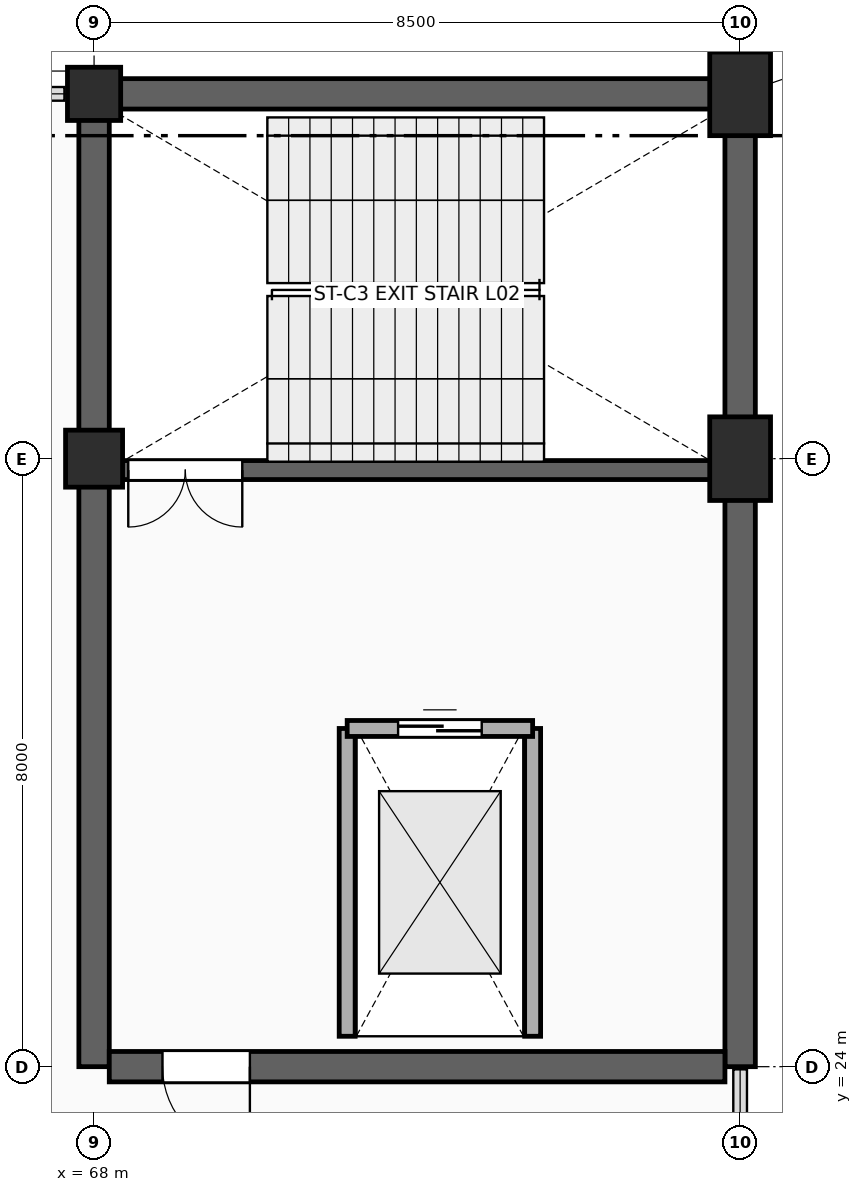
"""IFC4 building model, lengths in metres.
Left out: names, types, materials, properties, quantities, classifications, styles, units other than length and angle.
Written with IfcOpenShell. Run it as: python <this file> out.ifc"""

import sys

from ifc_helpers import new_model, si_unit, direction, frame, frame_2d, origin, origin_2d, place, context, subcontext, project, spatial, rectangle, extrude, element, fill, save


model = new_model("IFC4")
c1 = context("Model", 3, precision=1e-05, world=origin(), true_north=direction((0.0, 1.0)))
c2 = subcontext(c1, "Body", "Model", "MODEL_VIEW")
j1 = project(units=[si_unit("LENGTHUNIT", "METRE"), si_unit("PLANEANGLEUNIT", "RADIAN")], contexts=[c1])
p1 = place(None, origin())
s1 = spatial("IfcSite", under=j1, at=p1, CompositionType="ELEMENT")
p2 = place(p1, origin())
s2 = spatial("IfcBuilding", under=s1, at=p2, CompositionType="ELEMENT")
p3 = place(p2, frame((0.0, 0.0, 10.2)))
s3 = spatial("IfcBuildingStorey", under=s2, at=p3, CompositionType="ELEMENT", Elevation=10.2)
for number, where, z_axis, x_axis in (
    (1, (68.0, 24.0, 0.0), (0.0, 0.0, 1.0), (0.0, 1.0, 0.0)),
    (2, (76.5, 24.0, 0.0), (0.0, 0.0, 1.0), (0.0, 1.0, 0.0)),
):
    element("IfcWall", number, at=place(p3, frame(where, z_axis=z_axis, x_axis=x_axis)), inside=s3, PredefinedType="SHEAR", context=c2, shape_type="SweptSolid", body=[
        extrude(rectangle(XDim=12.8, YDim=0.4, at=frame_2d((6.4, 0.0))), origin(), (0.0, 0.0, 1.0), 4.64),
    ])
p4 = place(p3, frame((68.2, 36.8, 0.0), z_axis=(0.0, 0.0, 1.0), x_axis=(1.0, 0.0, 0.0)))
e3 = element("IfcWall", 3, at=p4, inside=s3, PredefinedType="SHEAR", context=c2, shape_type="SweptSolid", body=[
    extrude(rectangle(XDim=8.1, YDim=0.4, at=frame_2d((4.05, 0.0))), origin(), (0.0, 0.0, 1.0), 4.64),
])
p5 = place(p3, frame((68.2, 24.0, 0.0), z_axis=(0.0, 0.0, 1.0), x_axis=(1.0, 0.0, 0.0)))
e4 = element("IfcWall", 4, at=p5, inside=s3, PredefinedType="SHEAR", context=c2, shape_type="SweptSolid", body=[
    extrude(rectangle(XDim=8.1, YDim=0.4, at=frame_2d((4.05, 0.0))), origin(), (0.0, 0.0, 1.0), 4.64),
])
p6 = place(p5, frame((0.7, 0.0, 0.0)))
e5 = element("IfcOpeningElement", 5, at=p6, cuts=e4, PredefinedType="OPENING", context=c2, shape_type="SweptSolid", body=[
    extrude(rectangle(XDim=1.15, YDim=2.2, at=frame_2d((0.575, 1.1))), frame((0.0, 0.212, 0.0), z_axis=(0.0, -1.0, 0.0), x_axis=(1.0, 0.0, 0.0)), (0.0, 0.0, 1.0), 0.424),
])
p7 = place(p3, frame((68.25, 31.85, 0.0), z_axis=(0.0, 0.0, 1.0), x_axis=(1.0, 0.0, 0.0)))
e6 = element("IfcWall", 6, at=p7, inside=s3, PredefinedType="STANDARD", context=c2, shape_type="SweptSolid", body=[
    extrude(rectangle(XDim=8.0, YDim=0.25, at=frame_2d((4.0, 0.0))), origin(), (0.0, 0.0, 1.0), 4.64),
])
p8 = place(p7, frame((0.2, 0.0, 0.0)))
e7 = element("IfcOpeningElement", 7, at=p8, cuts=e6, PredefinedType="OPENING", context=c2, shape_type="SweptSolid", body=[
    extrude(rectangle(XDim=1.5, YDim=2.2, at=frame_2d((0.75, 1.1))), frame((0.0, 0.137, 0.0), z_axis=(0.0, -1.0, 0.0), x_axis=(1.0, 0.0, 0.0)), (0.0, 0.0, 1.0), 0.274),
])
for number, where, z_axis, x_axis in (
    (8, (71.33, 24.4, 0.0), (0.0, 0.0, 1.0), (0.0, 1.0, 0.0)),
    (9, (73.77, 24.4, 0.0), (0.0, 0.0, 1.0), (0.0, 1.0, 0.0)),
):
    element("IfcWall", number, at=place(p3, frame(where, z_axis=z_axis, x_axis=x_axis)), inside=s3, PredefinedType="PARTITIONING", context=c2, shape_type="SweptSolid", body=[
        extrude(rectangle(XDim=4.05, YDim=0.21, at=frame_2d((2.025, 0.0))), origin(), (0.0, 0.0, 1.0), 4.64),
    ])
p9 = place(p3, frame((71.33, 28.45, 0.0), z_axis=(0.0, 0.0, 1.0), x_axis=(1.0, 0.0, 0.0)))
e10 = element("IfcWall", 10, at=p9, inside=s3, PredefinedType="PARTITIONING", context=c2, shape_type="SweptSolid", body=[
    extrude(rectangle(XDim=2.44, YDim=0.21, at=frame_2d((1.22, 0.0))), origin(), (0.0, 0.0, 1.0), 4.64),
])
p10 = place(p9, frame((0.67, 0.0, 0.0)))
e11 = element("IfcOpeningElement", 11, at=p10, cuts=e10, PredefinedType="OPENING", context=c2, shape_type="SweptSolid", body=[
    extrude(rectangle(XDim=1.1, YDim=2.2, at=frame_2d((0.55, 1.1))), frame((0.0, 0.117, 0.0), z_axis=(0.0, -1.0, 0.0), x_axis=(1.0, 0.0, 0.0)), (0.0, 0.0, 1.0), 0.234),
])
p11 = place(p3, frame((68.0, 32.0, 0.0), z_axis=(0.0, 0.0, 1.0), x_axis=(1.0, 0.0, 0.0)))
e12 = element("IfcColumn", 12, at=p11, inside=s3, PredefinedType="COLUMN", context=c2, shape_type="SweptSolid", body=[
    extrude(rectangle(XDim=0.75, YDim=0.75, at=origin_2d()), origin(), (0.0, 0.0, 1.0), 4.52),
])
p12 = place(p3, frame((68.0, 36.8, 0.0), z_axis=(0.0, 0.0, 1.0), x_axis=(1.0, 0.0, 0.0)))
e13 = element("IfcColumn", 13, at=p12, inside=s3, PredefinedType="COLUMN", context=c2, shape_type="SweptSolid", body=[
    extrude(rectangle(XDim=0.7, YDim=0.7, at=origin_2d()), origin(), (0.0, 0.0, 1.0), 4.52),
])
for number, where, z_axis, x_axis in (
    (14, (76.5, 32.0, 0.0), (0.0, 0.0, 1.0), (1.0, 0.0, 0.0)),
    (15, (76.5, 36.8, 0.0), (0.0, 0.0, 1.0), (1.0, 0.0, 0.0)),
):
    element("IfcColumn", number, at=place(p3, frame(where, z_axis=z_axis, x_axis=x_axis)), inside=s3, PredefinedType="COLUMN", context=c2, shape_type="SweptSolid", body=[
        extrude(rectangle(XDim=0.8, YDim=1.1, at=origin_2d()), origin(), (0.0, 0.0, 1.0), 4.54),
    ])
p13 = place(p8, frame((1.5, 0.0, 0.0), z_axis=(0.0, 0.0, 1.0), x_axis=(-1.0, 0.0, 0.0)))
e16 = element("IfcDoor", 16, at=p13, inside=s3, OperationType="DOUBLE_DOOR_SINGLE_SWING", PredefinedType="DOOR", context=c2, shape_type="SweptSolid", body=[
    extrude(rectangle(XDim=1.5, YDim=2.2, at=frame_2d((0.75, 1.1))), frame((0.0, 0.025, 0.0), z_axis=(0.0, -1.0, 0.0), x_axis=(1.0, 0.0, 0.0)), (0.0, 0.0, 1.0), 0.05),
])
fill(e7, e16)
p14 = place(p10, origin())
e17 = element("IfcDoor", 17, at=p14, inside=s3, OperationType="DOUBLE_DOOR_SLIDING", PredefinedType="DOOR", context=c2, shape_type="SweptSolid", body=[
    extrude(rectangle(XDim=1.1, YDim=2.2, at=frame_2d((0.55, 1.1))), frame((0.0, 0.025, 0.0), z_axis=(0.0, -1.0, 0.0), x_axis=(1.0, 0.0, 0.0)), (0.0, 0.0, 1.0), 0.05),
])
fill(e11, e17)
p15 = place(p6, frame((1.15, 0.0, 0.0), z_axis=(0.0, 0.0, 1.0), x_axis=(-1.0, 0.0, 0.0)))
e18 = element("IfcDoor", 18, at=p15, inside=s3, OperationType="SINGLE_SWING_RIGHT", PredefinedType="DOOR", context=c2, shape_type="SweptSolid", body=[
    extrude(rectangle(XDim=1.15, YDim=2.2, at=frame_2d((0.575, 1.1))), frame((0.0, 0.025, 0.0), z_axis=(0.0, -1.0, 0.0), x_axis=(1.0, 0.0, 0.0)), (0.0, 0.0, 1.0), 0.05),
])
fill(e5, e18)
save(model, sys.argv[1])
